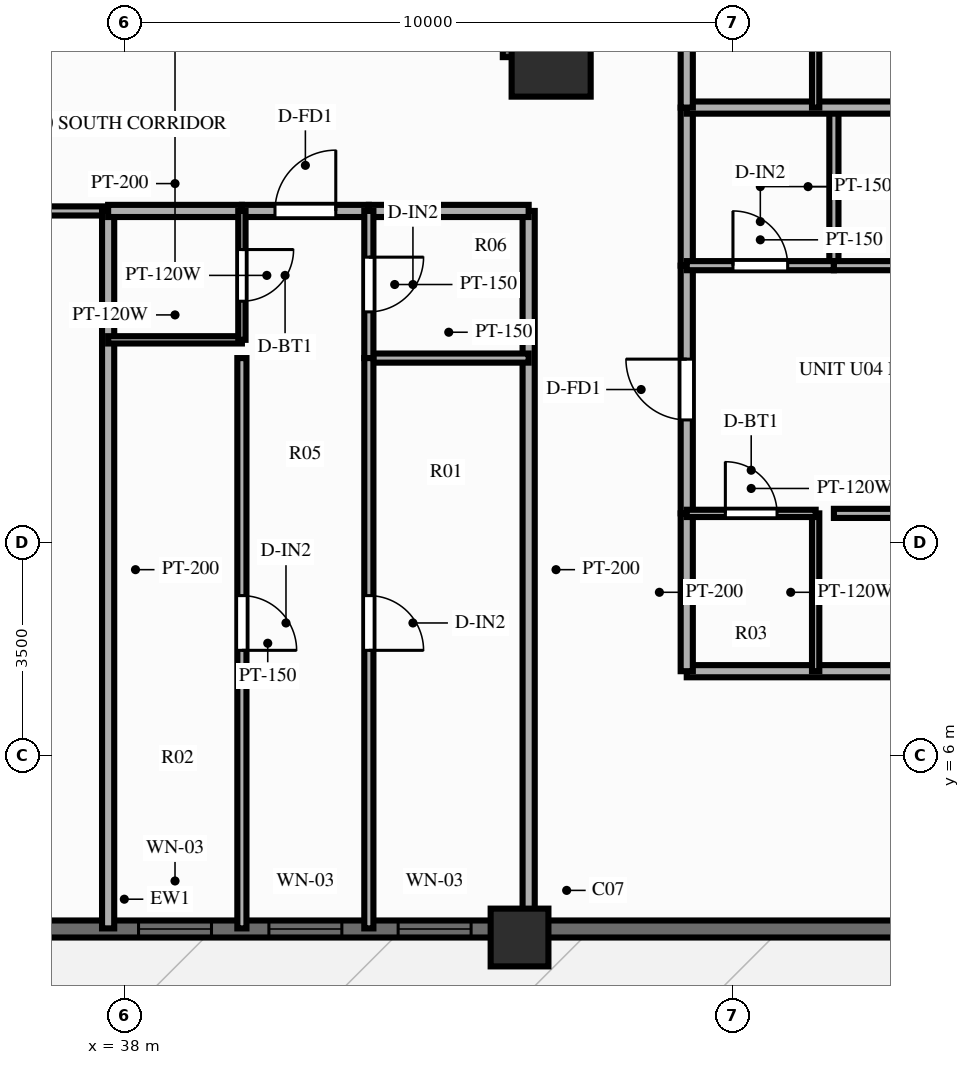
"""IFC4 building model, lengths in metres.
Left out: names, types, materials, properties, quantities, classifications, styles, units other than length and angle.
Written with IfcOpenShell. Run it as: python <this file> out.ifc"""

import sys

from ifc_helpers import new_model, si_unit, direction, frame, frame_2d, origin, origin_2d, place, context, subcontext, project, spatial, rectangle, extrude, source, transform, mapped, element, fill, save


model = new_model("IFC4")
c1 = context("Model", 3, precision=1e-05, world=origin(), true_north=direction((0.0, 1.0)))
c2 = subcontext(c1, "Body", "Model", "MODEL_VIEW")
j1 = project(units=[si_unit("LENGTHUNIT", "METRE"), si_unit("PLANEANGLEUNIT", "RADIAN")], contexts=[c1])
p1 = place(None, origin())
s1 = spatial("IfcSite", under=j1, at=p1, CompositionType="ELEMENT")
p2 = place(p1, origin())
s2 = spatial("IfcBuilding", under=s1, at=p2, CompositionType="ELEMENT")
p3 = place(p2, frame((0.0, 0.0, 95.85)))
s3 = spatial("IfcBuildingStorey", under=s2, at=p3, CompositionType="ELEMENT", Elevation=95.85)
p4 = place(p3, frame((44.5, 17.48, 0.0), z_axis=(0.0, 0.0, 1.0), x_axis=(0.0, 1.0, 0.0)))
e1 = element("IfcWall", 1, at=p4, inside=s3, PredefinedType="SHEAR", context=c2, shape_type="SweptSolid", body=[
    extrude(rectangle(XDim=19.04, YDim=0.55, at=frame_2d((9.52, 0.0))), origin(), (0.0, 0.0, 1.0), 3.0),
])
p5 = place(p4, frame((12.67, 0.0, 0.0), z_axis=(0.0, 0.0, 1.0), x_axis=(-1.0, 0.0, 0.0)))
e2 = element("IfcOpeningElement", 2, at=p5, cuts=e1, PredefinedType="OPENING", context=c2, shape_type="SweptSolid", body=[
    extrude(rectangle(XDim=1.1, YDim=2.15, at=frame_2d((0.55, 1.075))), frame((0.0, 0.287, 0.0), z_axis=(0.0, -1.0, 0.0), x_axis=(1.0, 0.0, 0.0)), (0.0, 0.0, 1.0), 0.574),
])
m1 = source(origin(), c2, "Body", "SweptSolid", [
    extrude(rectangle(XDim=1.3, YDim=1.3, at=origin_2d()), origin(), (0.0, 0.0, 1.0), 3.0),
])
p6 = place(p3, frame((45.02, 17.48, 0.0), z_axis=(0.0, 0.0, 1.0), x_axis=(1.0, 0.0, 0.0)))
e3 = element("IfcColumn", 3, at=p6, inside=s3, PredefinedType="COLUMN", context=c2, shape_type="MappedRepresentation", body=[
    mapped(m1, transform((0.0, 0.0, 0.0), scale=1.0)),
])
m2 = source(origin(), c2, "Body", "SweptSolid", [
    extrude(rectangle(XDim=0.95, YDim=0.95, at=origin_2d()), origin(), (0.0, 0.0, 1.0), 3.0),
])
p7 = place(p3, frame((44.5, 3.0, 0.0), z_axis=(0.0, 0.0, 1.0), x_axis=(1.0, 0.0, 0.0)))
e4 = element("IfcColumn", 4, at=p7, inside=s3, PredefinedType="COLUMN", context=c2, shape_type="MappedRepresentation", body=[
    mapped(m2, transform((0.0, 0.0, 0.0), scale=1.0)),
])
p8 = place(p3, frame((16.2, 3.14, 0.0), z_axis=(0.0, 0.0, 1.0), x_axis=(1.0, 0.0, 0.0)))
e5 = element("IfcWall", 5, at=p8, inside=s3, PredefinedType="SOLIDWALL", context=c2, shape_type="SweptSolid", body=[
    extrude(rectangle(XDim=43.6, YDim=0.28, at=frame_2d((21.8, 0.0))), origin(), (0.0, 0.0, 1.0), 2.28),
])
p9 = place(p8, frame((8.2, 0.0, 0.0), z_axis=(0.0, 0.0, 1.0), x_axis=(-1.0, 0.0, 0.0)))
e6 = element("IfcOpeningElement", 6, at=p9, cuts=e5, PredefinedType="OPENING", context=c2, shape_type="SweptSolid", body=[
    extrude(rectangle(XDim=1.1, YDim=2.15, at=frame_2d((0.55, 1.075))), frame((0.0, 0.152, 0.0), z_axis=(0.0, -1.0, 0.0), x_axis=(1.0, 0.0, 0.0)), (0.0, 0.0, 1.0), 0.304),
])
p10 = place(p8, frame((17.975, 0.0, 0.25)))
e7 = element("IfcOpeningElement", 7, at=p10, cuts=e5, PredefinedType="OPENING", context=c2, shape_type="SweptSolid", body=[
    extrude(rectangle(XDim=1.2, YDim=1.5, at=frame_2d((0.6, 0.75))), frame((0.0, 0.152, 0.0), z_axis=(0.0, -1.0, 0.0), x_axis=(1.0, 0.0, 0.0)), (0.0, 0.0, 1.0), 0.304),
])
p11 = place(p8, frame((22.034, 0.0, 0.25)))
e8 = element("IfcOpeningElement", 8, at=p11, cuts=e5, PredefinedType="OPENING", context=c2, shape_type="SweptSolid", body=[
    extrude(rectangle(XDim=1.2, YDim=1.5, at=frame_2d((0.6, 0.75))), frame((0.0, 0.152, 0.0), z_axis=(0.0, -1.0, 0.0), x_axis=(1.0, 0.0, 0.0)), (0.0, 0.0, 1.0), 0.304),
])
p12 = place(p8, frame((24.178, 0.0, 0.25)))
e9 = element("IfcOpeningElement", 9, at=p12, cuts=e5, PredefinedType="OPENING", context=c2, shape_type="SweptSolid", body=[
    extrude(rectangle(XDim=1.2, YDim=1.5, at=frame_2d((0.6, 0.75))), frame((0.0, 0.152, 0.0), z_axis=(0.0, -1.0, 0.0), x_axis=(1.0, 0.0, 0.0)), (0.0, 0.0, 1.0), 0.304),
])
p13 = place(p8, frame((26.303, 0.0, 0.25)))
e10 = element("IfcOpeningElement", 10, at=p13, cuts=e5, PredefinedType="OPENING", context=c2, shape_type="SweptSolid", body=[
    extrude(rectangle(XDim=1.2, YDim=1.5, at=frame_2d((0.6, 0.75))), frame((0.0, 0.152, 0.0), z_axis=(0.0, -1.0, 0.0), x_axis=(1.0, 0.0, 0.0)), (0.0, 0.0, 1.0), 0.304),
])
p14 = place(p8, frame((35.35, 0.0, 0.25)))
e11 = element("IfcOpeningElement", 11, at=p14, cuts=e5, PredefinedType="OPENING", context=c2, shape_type="SweptSolid", body=[
    extrude(rectangle(XDim=1.2, YDim=1.5, at=frame_2d((0.6, 0.75))), frame((0.0, 0.152, 0.0), z_axis=(0.0, -1.0, 0.0), x_axis=(1.0, 0.0, 0.0)), (0.0, 0.0, 1.0), 0.304),
])
p15 = place(p3, frame((44.65, 14.95, 0.0), z_axis=(0.0, 0.0, 1.0), x_axis=(0.0, -1.0, 0.0)))
e12 = element("IfcWall", 12, at=p15, inside=s3, PredefinedType="PARTITIONING", context=c2, shape_type="SweptSolid", body=[
    extrude(rectangle(XDim=11.8, YDim=0.2, at=frame_2d((5.9, 0.0))), origin(), (0.0, 0.0, 1.0), 2.34),
])
p16 = place(p3, frame((31.35, 14.95, 0.0), z_axis=(0.0, 0.0, 1.0), x_axis=(1.0, 0.0, 0.0)))
e13 = element("IfcWall", 13, at=p16, inside=s3, PredefinedType="PARTITIONING", context=c2, shape_type="SweptSolid", body=[
    extrude(rectangle(XDim=6.384, YDim=0.15, at=frame_2d((3.192, 0.0))), origin(), (0.0, 0.0, 1.0), 2.79),
])
p17 = place(p16, frame((2.642, 0.0, 0.0)))
e14 = element("IfcOpeningElement", 14, at=p17, cuts=e13, PredefinedType="OPENING", context=c2, shape_type="SweptSolid", body=[
    extrude(rectangle(XDim=1.1, YDim=2.15, at=frame_2d((0.55, 1.075))), frame((0.0, 0.087, 0.0), z_axis=(0.0, -1.0, 0.0), x_axis=(1.0, 0.0, 0.0)), (0.0, 0.0, 1.0), 0.174),
])
p18 = place(p3, frame((37.734, 14.95, 0.0), z_axis=(0.0, 0.0, 1.0), x_axis=(0.0, -1.0, 0.0)))
e15 = element("IfcWall", 15, at=p18, inside=s3, PredefinedType="PARTITIONING", context=c2, shape_type="SweptSolid", body=[
    extrude(rectangle(XDim=11.8, YDim=0.2, at=frame_2d((5.9, 0.0))), origin(), (0.0, 0.0, 1.0), 2.79),
])
p19 = place(p3, frame((37.734, 14.95, 0.0), z_axis=(0.0, 0.0, 1.0), x_axis=(1.0, 0.0, 0.0)))
e16 = element("IfcWall", 16, at=p19, inside=s3, PredefinedType="PARTITIONING", context=c2, shape_type="SweptSolid", body=[
    extrude(rectangle(XDim=2.2, YDim=0.2, at=frame_2d((1.1, 0.0))), origin(), (0.0, 0.0, 1.0), 2.79),
])
p20 = place(p3, frame((39.934, 14.95, 0.0), z_axis=(0.0, 0.0, 1.0), x_axis=(1.0, 0.0, 0.0)))
e17 = element("IfcWall", 17, at=p20, inside=s3, PredefinedType="PARTITIONING", context=c2, shape_type="SweptSolid", body=[
    extrude(rectangle(XDim=2.088, YDim=0.2, at=frame_2d((1.044, 0.0))), origin(), (0.0, 0.0, 1.0), 2.79),
])
p21 = place(p20, frame((0.544, 0.0, 0.0)))
e18 = element("IfcOpeningElement", 18, at=p21, cuts=e17, PredefinedType="OPENING", context=c2, shape_type="SweptSolid", body=[
    extrude(rectangle(XDim=1.0, YDim=2.15, at=frame_2d((0.5, 1.075))), frame((0.0, 0.112, 0.0), z_axis=(0.0, -1.0, 0.0), x_axis=(1.0, 0.0, 0.0)), (0.0, 0.0, 1.0), 0.224),
])
p22 = place(p3, frame((42.022, 14.95, 0.0), z_axis=(0.0, 0.0, 1.0), x_axis=(1.0, 0.0, 0.0)))
e19 = element("IfcWall", 19, at=p22, inside=s3, PredefinedType="PARTITIONING", context=c2, shape_type="SweptSolid", body=[
    extrude(rectangle(XDim=2.628, YDim=0.2, at=frame_2d((1.314, 0.0))), origin(), (0.0, 0.0, 1.0), 2.79),
])
p23 = place(p3, frame((37.734, 12.83, 0.0), z_axis=(0.0, 0.0, 1.0), x_axis=(1.0, 0.0, 0.0)))
e20 = element("IfcWall", 20, at=p23, inside=s3, PredefinedType="PARTITIONING", context=c2, shape_type="SweptSolid", body=[
    extrude(rectangle(XDim=2.2, YDim=0.12, at=frame_2d((1.1, 0.0))), origin(), (0.0, 0.0, 1.0), 2.79),
])
p24 = place(p3, frame((42.022, 12.53, 0.0), z_axis=(0.0, 0.0, 1.0), x_axis=(1.0, 0.0, 0.0)))
e21 = element("IfcWall", 21, at=p24, inside=s3, PredefinedType="PARTITIONING", context=c2, shape_type="SweptSolid", body=[
    extrude(rectangle(XDim=2.628, YDim=0.15, at=frame_2d((1.314, 0.0))), origin(), (0.0, 0.0, 1.0), 2.79),
])
p25 = place(p3, frame((39.934, 14.95, 0.0), z_axis=(0.0, 0.0, 1.0), x_axis=(0.0, -1.0, 0.0)))
e22 = element("IfcWall", 22, at=p25, inside=s3, PredefinedType="PARTITIONING", context=c2, shape_type="SweptSolid", body=[
    extrude(rectangle(XDim=2.12, YDim=0.12, at=frame_2d((1.06, 0.0))), origin(), (0.0, 0.0, 1.0), 2.79),
])
p26 = place(p25, frame((0.635, 0.0, 0.0)))
e23 = element("IfcOpeningElement", 23, at=p26, cuts=e22, PredefinedType="OPENING", context=c2, shape_type="SweptSolid", body=[
    extrude(rectangle(XDim=0.85, YDim=2.05, at=frame_2d((0.425, 1.025))), frame((0.0, 0.072, 0.0), z_axis=(0.0, -1.0, 0.0), x_axis=(1.0, 0.0, 0.0)), (0.0, 0.0, 1.0), 0.144),
])
p27 = place(p3, frame((39.934, 12.53, 0.0), z_axis=(0.0, 0.0, 1.0), x_axis=(0.0, -1.0, 0.0)))
e24 = element("IfcWall", 24, at=p27, inside=s3, PredefinedType="PARTITIONING", context=c2, shape_type="SweptSolid", body=[
    extrude(rectangle(XDim=9.38, YDim=0.15, at=frame_2d((4.69, 0.0))), origin(), (0.0, 0.0, 1.0), 2.79),
])
p28 = place(p27, frame((3.907, 0.0, 0.0)))
e25 = element("IfcOpeningElement", 25, at=p28, cuts=e24, PredefinedType="OPENING", context=c2, shape_type="SweptSolid", body=[
    extrude(rectangle(XDim=0.9, YDim=2.1, at=frame_2d((0.45, 1.05))), frame((0.0, 0.087, 0.0), z_axis=(0.0, -1.0, 0.0), x_axis=(1.0, 0.0, 0.0)), (0.0, 0.0, 1.0), 0.174),
])
p29 = place(p3, frame((42.022, 14.95, 0.0), z_axis=(0.0, 0.0, 1.0), x_axis=(0.0, -1.0, 0.0)))
e26 = element("IfcWall", 26, at=p29, inside=s3, PredefinedType="PARTITIONING", context=c2, shape_type="SweptSolid", body=[
    extrude(rectangle(XDim=2.42, YDim=0.15, at=frame_2d((1.21, 0.0))), origin(), (0.0, 0.0, 1.0), 2.79),
])
p30 = place(p29, frame((0.76, 0.0, 0.0)))
e27 = element("IfcOpeningElement", 27, at=p30, cuts=e26, PredefinedType="OPENING", context=c2, shape_type="SweptSolid", body=[
    extrude(rectangle(XDim=0.9, YDim=2.1, at=frame_2d((0.45, 1.05))), frame((0.0, 0.087, 0.0), z_axis=(0.0, -1.0, 0.0), x_axis=(1.0, 0.0, 0.0)), (0.0, 0.0, 1.0), 0.174),
])
p31 = place(p3, frame((42.022, 12.53, 0.0), z_axis=(0.0, 0.0, 1.0), x_axis=(0.0, -1.0, 0.0)))
e28 = element("IfcWall", 28, at=p31, inside=s3, PredefinedType="PARTITIONING", context=c2, shape_type="SweptSolid", body=[
    extrude(rectangle(XDim=9.38, YDim=0.15, at=frame_2d((4.69, 0.0))), origin(), (0.0, 0.0, 1.0), 2.79),
])
p32 = place(p31, frame((3.907, 0.0, 0.0)))
e29 = element("IfcOpeningElement", 29, at=p32, cuts=e28, PredefinedType="OPENING", context=c2, shape_type="SweptSolid", body=[
    extrude(rectangle(XDim=0.9, YDim=2.1, at=frame_2d((0.45, 1.05))), frame((0.0, 0.087, 0.0), z_axis=(0.0, -1.0, 0.0), x_axis=(1.0, 0.0, 0.0)), (0.0, 0.0, 1.0), 0.174),
])
p33 = place(p3, frame((47.25, 7.38, 0.0), z_axis=(0.0, 0.0, 1.0), x_axis=(1.0, 0.0, 0.0)))
e30 = element("IfcWall", 30, at=p33, inside=s3, PredefinedType="PARTITIONING", context=c2, shape_type="SweptSolid", body=[
    extrude(rectangle(XDim=16.6, YDim=0.2, at=frame_2d((8.3, 0.0))), origin(), (0.0, 0.0, 1.0), 2.79),
])
p34 = place(p3, frame((47.25, 7.38, 0.0), z_axis=(0.0, 0.0, 1.0), x_axis=(0.0, 1.0, 0.0)))
e31 = element("IfcWall", 31, at=p34, inside=s3, PredefinedType="PARTITIONING", context=c2, shape_type="SweptSolid", body=[
    extrude(rectangle(XDim=2.596, YDim=0.2, at=frame_2d((1.298, 0.0))), origin(), (0.0, 0.0, 1.0), 2.79),
])
p35 = place(p3, frame((47.25, 9.976, 0.0), z_axis=(0.0, 0.0, 1.0), x_axis=(0.0, 1.0, 0.0)))
e32 = element("IfcWall", 32, at=p35, inside=s3, PredefinedType="PARTITIONING", context=c2, shape_type="SweptSolid", body=[
    extrude(rectangle(XDim=4.074, YDim=0.2, at=frame_2d((2.037, 0.0))), origin(), (0.0, 0.0, 1.0), 2.79),
])
p36 = place(p35, frame((1.537, 0.0, 0.0)))
e33 = element("IfcOpeningElement", 33, at=p36, cuts=e32, PredefinedType="OPENING", context=c2, shape_type="SweptSolid", body=[
    extrude(rectangle(XDim=1.0, YDim=2.15, at=frame_2d((0.5, 1.075))), frame((0.0, 0.112, 0.0), z_axis=(0.0, -1.0, 0.0), x_axis=(1.0, 0.0, 0.0)), (0.0, 0.0, 1.0), 0.224),
])
p37 = place(p3, frame((47.25, 14.05, 0.0), z_axis=(0.0, 0.0, 1.0), x_axis=(0.0, 1.0, 0.0)))
e34 = element("IfcWall", 34, at=p37, inside=s3, PredefinedType="PARTITIONING", context=c2, shape_type="SweptSolid", body=[
    extrude(rectangle(XDim=2.6, YDim=0.2, at=frame_2d((1.3, 0.0))), origin(), (0.0, 0.0, 1.0), 2.79),
])
p38 = place(p3, frame((49.37, 7.38, 0.0), z_axis=(0.0, 0.0, 1.0), x_axis=(0.0, 1.0, 0.0)))
e35 = element("IfcWall", 35, at=p38, inside=s3, PredefinedType="PARTITIONING", context=c2, shape_type="SweptSolid", body=[
    extrude(rectangle(XDim=2.596, YDim=0.12, at=frame_2d((1.298, 0.0))), origin(), (0.0, 0.0, 1.0), 2.79),
])
p39 = place(p3, frame((49.67, 14.05, 0.0), z_axis=(0.0, 0.0, 1.0), x_axis=(0.0, 1.0, 0.0)))
e36 = element("IfcWall", 36, at=p39, inside=s3, PredefinedType="PARTITIONING", context=c2, shape_type="SweptSolid", body=[
    extrude(rectangle(XDim=2.6, YDim=0.15, at=frame_2d((1.3, 0.0))), origin(), (0.0, 0.0, 1.0), 2.79),
])
p40 = place(p3, frame((47.25, 9.976, 0.0), z_axis=(0.0, 0.0, 1.0), x_axis=(1.0, 0.0, 0.0)))
e37 = element("IfcWall", 37, at=p40, inside=s3, PredefinedType="PARTITIONING", context=c2, shape_type="SweptSolid", body=[
    extrude(rectangle(XDim=2.12, YDim=0.12, at=frame_2d((1.06, 0.0))), origin(), (0.0, 0.0, 1.0), 2.79),
])
p41 = place(p40, frame((0.635, 0.0, 0.0)))
e38 = element("IfcOpeningElement", 38, at=p41, cuts=e37, PredefinedType="OPENING", context=c2, shape_type="SweptSolid", body=[
    extrude(rectangle(XDim=0.85, YDim=2.05, at=frame_2d((0.425, 1.025))), frame((0.0, 0.072, 0.0), z_axis=(0.0, -1.0, 0.0), x_axis=(1.0, 0.0, 0.0)), (0.0, 0.0, 1.0), 0.144),
])
p42 = place(p3, frame((49.67, 9.976, 0.0), z_axis=(0.0, 0.0, 1.0), x_axis=(1.0, 0.0, 0.0)))
e39 = element("IfcWall", 39, at=p42, inside=s3, PredefinedType="PARTITIONING", context=c2, shape_type="SweptSolid", body=[
    extrude(rectangle(XDim=14.18, YDim=0.15, at=frame_2d((7.09, 0.0))), origin(), (0.0, 0.0, 1.0), 2.79),
])
p43 = place(p42, frame((6.107, 0.0, 0.0)))
e40 = element("IfcOpeningElement", 40, at=p43, cuts=e39, PredefinedType="OPENING", context=c2, shape_type="SweptSolid", body=[
    extrude(rectangle(XDim=0.9, YDim=2.1, at=frame_2d((0.45, 1.05))), frame((0.0, 0.087, 0.0), z_axis=(0.0, -1.0, 0.0), x_axis=(1.0, 0.0, 0.0)), (0.0, 0.0, 1.0), 0.174),
])
p44 = place(p3, frame((47.25, 14.05, 0.0), z_axis=(0.0, 0.0, 1.0), x_axis=(1.0, 0.0, 0.0)))
e41 = element("IfcWall", 41, at=p44, inside=s3, PredefinedType="PARTITIONING", context=c2, shape_type="SweptSolid", body=[
    extrude(rectangle(XDim=2.42, YDim=0.15, at=frame_2d((1.21, 0.0))), origin(), (0.0, 0.0, 1.0), 2.79),
])
p45 = place(p44, frame((0.76, 0.0, 0.0)))
e42 = element("IfcOpeningElement", 42, at=p45, cuts=e41, PredefinedType="OPENING", context=c2, shape_type="SweptSolid", body=[
    extrude(rectangle(XDim=0.9, YDim=2.1, at=frame_2d((0.45, 1.05))), frame((0.0, 0.087, 0.0), z_axis=(0.0, -1.0, 0.0), x_axis=(1.0, 0.0, 0.0)), (0.0, 0.0, 1.0), 0.174),
])
p46 = place(p3, frame((49.67, 14.05, 0.0), z_axis=(0.0, 0.0, 1.0), x_axis=(1.0, 0.0, 0.0)))
e43 = element("IfcWall", 43, at=p46, inside=s3, PredefinedType="PARTITIONING", context=c2, shape_type="SweptSolid", body=[
    extrude(rectangle(XDim=14.18, YDim=0.15, at=frame_2d((7.09, 0.0))), origin(), (0.0, 0.0, 1.0), 2.79),
])
p47 = place(p46, frame((6.107, 0.0, 0.0)))
e44 = element("IfcOpeningElement", 44, at=p47, cuts=e43, PredefinedType="OPENING", context=c2, shape_type="SweptSolid", body=[
    extrude(rectangle(XDim=0.9, YDim=2.1, at=frame_2d((0.45, 1.05))), frame((0.0, 0.087, 0.0), z_axis=(0.0, -1.0, 0.0), x_axis=(1.0, 0.0, 0.0)), (0.0, 0.0, 1.0), 0.174),
])
p48 = place(p3, frame((47.25, 16.65, 0.0), z_axis=(0.0, 0.0, 1.0), x_axis=(1.0, 0.0, 0.0)))
e45 = element("IfcWall", 45, at=p48, inside=s3, PredefinedType="PARTITIONING", context=c2, shape_type="SweptSolid", body=[
    extrude(rectangle(XDim=16.6, YDim=0.2, at=frame_2d((8.3, 0.0))), origin(), (0.0, 0.0, 1.0), 2.79),
])
p49 = place(p3, frame((47.25, 16.65, 0.0), z_axis=(0.0, 0.0, 1.0), x_axis=(0.0, 1.0, 0.0)))
e46 = element("IfcWall", 46, at=p49, inside=s3, PredefinedType="PARTITIONING", context=c2, shape_type="SweptSolid", body=[
    extrude(rectangle(XDim=2.596, YDim=0.2, at=frame_2d((1.298, 0.0))), origin(), (0.0, 0.0, 1.0), 2.79),
])
p50 = place(p3, frame((49.37, 16.65, 0.0), z_axis=(0.0, 0.0, 1.0), x_axis=(0.0, 1.0, 0.0)))
e47 = element("IfcWall", 47, at=p50, inside=s3, PredefinedType="PARTITIONING", context=c2, shape_type="SweptSolid", body=[
    extrude(rectangle(XDim=2.596, YDim=0.12, at=frame_2d((1.298, 0.0))), origin(), (0.0, 0.0, 1.0), 2.79),
])
m3 = source(origin(), c2, "Body", "SweptSolid", [
    extrude(rectangle(XDim=1.2, YDim=1.5, at=frame_2d((0.6, 0.75))), frame((0.0, 0.03, 0.0), z_axis=(0.0, -1.0, 0.0), x_axis=(1.0, 0.0, 0.0)), (0.0, 0.0, 1.0), 0.06),
])
p51 = place(p11, origin())
e48 = element("IfcWindow", 48, at=p51, inside=s3, PartitioningType="SINGLE_PANEL", PredefinedType="WINDOW", context=c2, shape_type="MappedRepresentation", body=[
    mapped(m3, transform((0.0, 0.0, 0.0), scale=1.0)),
])
fill(e8, e48)
p52 = place(p12, origin())
e49 = element("IfcWindow", 49, at=p52, inside=s3, PartitioningType="SINGLE_PANEL", PredefinedType="WINDOW", context=c2, shape_type="MappedRepresentation", body=[
    mapped(m3, transform((0.0, 0.0, 0.0), scale=1.0)),
])
fill(e9, e49)
p53 = place(p13, origin())
e50 = element("IfcWindow", 50, at=p53, inside=s3, PartitioningType="SINGLE_PANEL", PredefinedType="WINDOW", context=c2, shape_type="MappedRepresentation", body=[
    mapped(m3, transform((0.0, 0.0, 0.0), scale=1.0)),
])
fill(e10, e50)
m4 = source(origin(), c2, "Body", "SweptSolid", [
    extrude(rectangle(XDim=1.0, YDim=2.15, at=frame_2d((0.5, 1.075))), frame((0.0, 0.025, 0.0), z_axis=(0.0, -1.0, 0.0), x_axis=(1.0, 0.0, 0.0)), (0.0, 0.0, 1.0), 0.05),
])
p54 = place(p21, origin())
e51 = element("IfcDoor", 51, at=p54, inside=s3, OperationType="SINGLE_SWING_RIGHT", PredefinedType="DOOR", context=c2, shape_type="MappedRepresentation", body=[
    mapped(m4, transform((0.0, 0.0, 0.0), scale=1.0)),
])
fill(e18, e51)
m5 = source(origin(), c2, "Body", "SweptSolid", [
    extrude(rectangle(XDim=0.85, YDim=2.05, at=frame_2d((0.425, 1.025))), frame((0.0, 0.025, 0.0), z_axis=(0.0, -1.0, 0.0), x_axis=(1.0, 0.0, 0.0)), (0.0, 0.0, 1.0), 0.05),
])
p55 = place(p26, origin())
e52 = element("IfcDoor", 52, at=p55, inside=s3, OperationType="SINGLE_SWING_LEFT", PredefinedType="DOOR", context=c2, shape_type="MappedRepresentation", body=[
    mapped(m5, transform((0.0, 0.0, 0.0), scale=1.0)),
])
fill(e23, e52)
m6 = source(origin(), c2, "Body", "SweptSolid", [
    extrude(rectangle(XDim=0.9, YDim=2.1, at=frame_2d((0.45, 1.05))), frame((0.0, 0.025, 0.0), z_axis=(0.0, -1.0, 0.0), x_axis=(1.0, 0.0, 0.0)), (0.0, 0.0, 1.0), 0.05),
])
p56 = place(p28, origin())
e53 = element("IfcDoor", 53, at=p56, inside=s3, OperationType="SINGLE_SWING_RIGHT", PredefinedType="DOOR", context=c2, shape_type="MappedRepresentation", body=[
    mapped(m6, transform((0.0, 0.0, 0.0), scale=1.0)),
])
fill(e25, e53)
p57 = place(p30, origin())
e54 = element("IfcDoor", 54, at=p57, inside=s3, OperationType="SINGLE_SWING_LEFT", PredefinedType="DOOR", context=c2, shape_type="MappedRepresentation", body=[
    mapped(m6, transform((0.0, 0.0, 0.0), scale=1.0)),
])
fill(e27, e54)
p58 = place(p32, origin())
e55 = element("IfcDoor", 55, at=p58, inside=s3, OperationType="SINGLE_SWING_RIGHT", PredefinedType="DOOR", context=c2, shape_type="MappedRepresentation", body=[
    mapped(m6, transform((0.0, 0.0, 0.0), scale=1.0)),
])
fill(e29, e55)
p59 = place(p36, origin())
e56 = element("IfcDoor", 56, at=p59, inside=s3, OperationType="SINGLE_SWING_RIGHT", PredefinedType="DOOR", context=c2, shape_type="MappedRepresentation", body=[
    mapped(m4, transform((0.0, 0.0, 0.0), scale=1.0)),
])
fill(e33, e56)
p60 = place(p41, origin())
e57 = element("IfcDoor", 57, at=p60, inside=s3, OperationType="SINGLE_SWING_LEFT", PredefinedType="DOOR", context=c2, shape_type="MappedRepresentation", body=[
    mapped(m5, transform((0.0, 0.0, 0.0), scale=1.0)),
])
fill(e38, e57)
p61 = place(p45, origin())
e58 = element("IfcDoor", 58, at=p61, inside=s3, OperationType="SINGLE_SWING_LEFT", PredefinedType="DOOR", context=c2, shape_type="MappedRepresentation", body=[
    mapped(m6, transform((0.0, 0.0, 0.0), scale=1.0)),
])
fill(e42, e58)
save(model, sys.argv[1])
